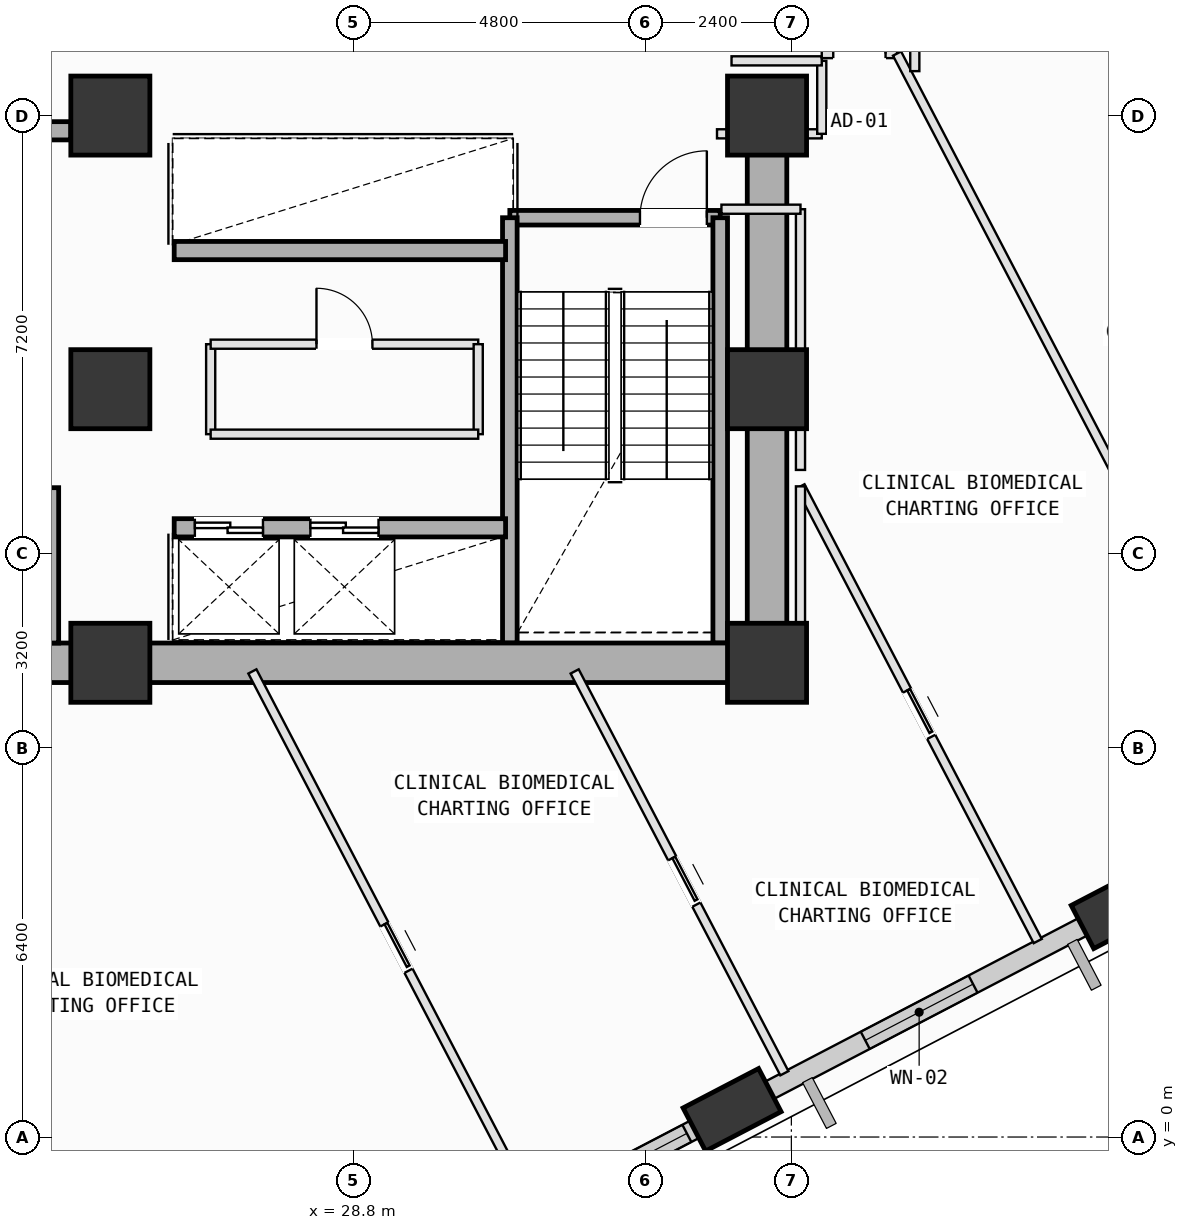
"""IFC4 building model, lengths in metres.
Left out: names, types, materials, properties, quantities, classifications, styles, units other than length and angle.
Written with IfcOpenShell. Run it as: python <this file> out.ifc"""

import sys

from ifc_helpers import new_model, si_unit, direction, frame, frame_2d, origin, origin_2d, place, context, subcontext, project, spatial, rectangle, extrude, element, fill, save


model = new_model("IFC4")
c1 = context("Model", 3, precision=1e-05, world=origin(), true_north=direction((0.0, 1.0)))
c2 = subcontext(c1, "Body", "Model", "MODEL_VIEW")
j1 = project(units=[si_unit("LENGTHUNIT", "METRE"), si_unit("PLANEANGLEUNIT", "RADIAN")], contexts=[c1])
p1 = place(None, origin())
s1 = spatial("IfcSite", under=j1, at=p1, CompositionType="ELEMENT")
p2 = place(p1, origin())
s2 = spatial("IfcBuilding", under=s1, at=p2, CompositionType="ELEMENT")
p3 = place(p2, frame((0.0, 0.0, 140.4)))
s3 = spatial("IfcBuildingStorey", under=s2, at=p3, CompositionType="ELEMENT", Elevation=140.4)
for number, where, z_axis, x_axis in (
    (1, (24.8, 7.8, 0.0), (0.0, 0.0, 1.0), (1.0, 0.0, 0.0)),
    (2, (24.8, 12.3, 0.0), (0.0, 0.0, 1.0), (1.0, 0.0, 0.0)),
    (3, (24.8, 16.8, 0.0), (0.0, 0.0, 1.0), (1.0, 0.0, 0.0)),
    (4, (35.6, 7.8, 0.0), (0.0, 0.0, 1.0), (1.0, 0.0, 0.0)),
    (5, (35.6, 12.3, 0.0), (0.0, 0.0, 1.0), (1.0, 0.0, 0.0)),
    (6, (35.6, 16.8, 0.0), (0.0, 0.0, 1.0), (1.0, 0.0, 0.0)),
):
    element("IfcColumn", number, at=place(p3, frame(where, z_axis=z_axis, x_axis=x_axis)), inside=s3, PredefinedType="COLUMN", context=c2, shape_type="SweptSolid", body=[
        extrude(rectangle(XDim=1.3, YDim=1.3, at=origin_2d()), origin(), (0.0, 0.0, 1.0), 4.0),
    ])
p4 = place(p3, frame((35.025, 0.448, 0.002), z_axis=(0.10037706971, 0.006741281946, 0.994926629955), x_axis=(-0.518552018438, 0.853779039419, 0.046531237063)))
e7 = element("IfcColumn", 7, at=p4, inside=s3, PredefinedType="COLUMN", context=c2, shape_type="SweptSolid", body=[
    extrude(rectangle(XDim=1.4, YDim=0.8, at=origin_2d()), origin(), (0.0, 0.0, 1.0), 3.948),
])
p5 = place(p3, frame((41.409, 3.778, 0.002), z_axis=(0.086534580575, 0.032944951033, 0.995703970348), x_axis=(-0.745854703715, 0.664730498128, 0.042826694996)))
e8 = element("IfcColumn", 8, at=p5, inside=s3, PredefinedType="COLUMN", context=c2, shape_type="SweptSolid", body=[
    extrude(rectangle(XDim=1.4, YDim=0.8, at=origin_2d()), origin(), (0.0, 0.0, 1.0), 3.95),
])
p6 = place(p3, frame((34.755, 0.307, 0.0), z_axis=(0.0, 0.0, 1.0), x_axis=(-0.886619757444, -0.462499087253, 0.0)))
e9 = element("IfcWall", 9, at=p6, inside=s3, PredefinedType="SOLIDWALL", context=c2, shape_type="SweptSolid", body=[
    extrude(rectangle(XDim=6.234, YDim=0.32, at=frame_2d((3.117, 0.0))), origin(), (0.0, 0.0, 1.0), 3.085),
])
p7 = place(p6, frame((0.534, 0.0, 0.75)))
e10 = element("IfcOpeningElement", 10, at=p7, cuts=e9, PredefinedType="OPENING", context=c2, shape_type="SweptSolid", body=[
    extrude(rectangle(XDim=1.6, YDim=1.95, at=frame_2d((0.8, 0.975))), frame((0.0, 0.17, 0.0), z_axis=(0.0, -1.0, 0.0), x_axis=(1.0, 0.0, 0.0)), (0.0, 0.0, 1.0), 0.34),
])
p8 = place(p3, frame((41.133, 3.634, 0.0), z_axis=(0.0, 0.0, 1.0), x_axis=(-0.886602358558, -0.462532439726, 0.0)))
e11 = element("IfcWall", 11, at=p8, inside=s3, PredefinedType="SOLIDWALL", context=c2, shape_type="SweptSolid", body=[
    extrude(rectangle(XDim=6.214, YDim=0.32, at=frame_2d((3.107, 0.0))), origin(), (0.0, 0.0, 1.0), 3.085),
])
p9 = place(p8, frame((2.419, 0.0, 0.75)))
e12 = element("IfcOpeningElement", 12, at=p9, cuts=e11, PredefinedType="OPENING", context=c2, shape_type="SweptSolid", body=[
    extrude(rectangle(XDim=2.0, YDim=1.95, at=frame_2d((1.0, 0.975))), frame((0.0, 0.17, 0.0), z_axis=(0.0, -1.0, 0.0), x_axis=(1.0, 0.0, 0.0)), (0.0, 0.0, 1.0), 0.34),
])
p10 = place(p3, frame((31.37, 15.12, 0.0), z_axis=(0.0, 0.0, 1.0), x_axis=(1.0, 0.0, 0.0)))
e13 = element("IfcWall", 13, at=p10, inside=s3, PredefinedType="SOLIDWALL", context=c2, shape_type="SweptSolid", body=[
    extrude(rectangle(XDim=3.46, YDim=0.24, at=frame_2d((1.73, 0.0))), origin(), (0.0, 0.0, 1.0), 3.7),
])
p11 = place(p10, frame((2.14, 0.0, 0.0)))
e14 = element("IfcOpeningElement", 14, at=p11, cuts=e13, PredefinedType="OPENING", context=c2, shape_type="SweptSolid", body=[
    extrude(rectangle(XDim=1.1, YDim=2.15, at=frame_2d((0.55, 1.075))), frame((0.0, 0.13, 0.0), z_axis=(0.0, -1.0, 0.0), x_axis=(1.0, 0.0, 0.0)), (0.0, 0.0, 1.0), 0.26),
])
for number, where, z_axis, x_axis in (
    (15, (34.83, 15.12, 0.0), (0.0, 0.0, 1.0), (0.0, -1.0, 0.0)),
    (16, (31.37, 8.125, 0.0), (0.0, 0.0, 1.0), (0.0, 1.0, 0.0)),
):
    element("IfcWall", number, at=place(p3, frame(where, z_axis=z_axis, x_axis=x_axis)), inside=s3, PredefinedType="SOLIDWALL", context=c2, shape_type="SweptSolid", body=[
        extrude(rectangle(XDim=6.995, YDim=0.24, at=frame_2d((3.498, 0.0))), origin(), (0.0, 0.0, 1.0), 3.7),
    ])
for number, where, z_axis, x_axis in (
    (17, (14.0, 7.8, 0.0), (0.0, 0.0, 1.0), (1.0, 0.0, 0.0)),
    (18, (24.8, 7.8, 0.0), (0.0, 0.0, 1.0), (1.0, 0.0, 0.0)),
):
    element("IfcWall", number, at=place(p3, frame(where, z_axis=z_axis, x_axis=x_axis)), inside=s3, PredefinedType="SHEAR", context=c2, shape_type="SweptSolid", body=[
        extrude(rectangle(XDim=10.8, YDim=0.65, at=frame_2d((5.4, 0.0))), origin(), (0.0, 0.0, 1.0), 3.7),
    ])
p12 = place(p3, frame((35.6, 7.8, 0.0), z_axis=(0.0, 0.0, 1.0), x_axis=(0.0, 1.0, 0.0)))
e19 = element("IfcWall", 19, at=p12, inside=s3, PredefinedType="SHEAR", context=c2, shape_type="SweptSolid", body=[
    extrude(rectangle(XDim=9.0, YDim=0.65, at=frame_2d((4.5, 0.0))), origin(), (0.0, 0.0, 1.0), 3.7),
])
p13 = place(p3, frame((19.85, 16.55, 0.0), z_axis=(0.0, 0.0, 1.0), x_axis=(1.0, 0.0, 0.0)))
e20 = element("IfcWall", 20, at=p13, inside=s3, PredefinedType="SOLIDWALL", context=c2, shape_type="SweptSolid", body=[
    extrude(rectangle(XDim=4.3, YDim=0.3, at=frame_2d((2.15, 0.0))), origin(), (0.0, 0.0, 1.0), 3.7),
])
p14 = place(p13, frame((0.475, 0.0, 0.0)))
e21 = element("IfcOpeningElement", 21, at=p14, cuts=e20, PredefinedType="OPENING", context=c2, shape_type="SweptSolid", body=[
    extrude(rectangle(XDim=1.25, YDim=2.18, at=frame_2d((0.625, 1.09))), frame((0.0, 0.16, 0.0), z_axis=(0.0, -1.0, 0.0), x_axis=(1.0, 0.0, 0.0)), (0.0, 0.0, 1.0), 0.32),
])
p15 = place(p13, frame((2.49, 0.0, 0.0)))
e22 = element("IfcOpeningElement", 22, at=p15, cuts=e20, PredefinedType="OPENING", context=c2, shape_type="SweptSolid", body=[
    extrude(rectangle(XDim=1.02, YDim=2.12, at=frame_2d((0.51, 1.06))), frame((0.0, 0.16, 0.0), z_axis=(0.0, -1.0, 0.0), x_axis=(1.0, 0.0, 0.0)), (0.0, 0.0, 1.0), 0.32),
])
p16 = place(p3, frame((23.8, 8.125, 0.0), z_axis=(0.0, 0.0, 1.0), x_axis=(0.0, 1.0, 0.0)))
e23 = element("IfcWall", 23, at=p16, inside=s3, PredefinedType="SOLIDWALL", context=c2, shape_type="SweptSolid", body=[
    extrude(rectangle(XDim=2.555, YDim=0.3, at=frame_2d((1.277, 0.0))), origin(), (0.0, 0.0, 1.0), 3.7),
])
p17 = place(p3, frame((25.85, 10.02, 0.0), z_axis=(0.0, 0.0, 1.0), x_axis=(1.0, 0.0, 0.0)))
e24 = element("IfcWall", 24, at=p17, inside=s3, PredefinedType="SOLIDWALL", context=c2, shape_type="SweptSolid", body=[
    extrude(rectangle(XDim=5.45, YDim=0.3, at=frame_2d((2.725, 0.0))), origin(), (0.0, 0.0, 1.0), 3.7),
])
p18 = place(p17, frame((0.34, 0.0, 0.0)))
e25 = element("IfcOpeningElement", 25, at=p18, cuts=e24, PredefinedType="OPENING", context=c2, shape_type="SweptSolid", body=[
    extrude(rectangle(XDim=1.12, YDim=2.15, at=frame_2d((0.56, 1.075))), frame((0.0, 0.16, 0.0), z_axis=(0.0, -1.0, 0.0), x_axis=(1.0, 0.0, 0.0)), (0.0, 0.0, 1.0), 0.32),
])
p19 = place(p17, frame((2.24, 0.0, 0.0)))
e26 = element("IfcOpeningElement", 26, at=p19, cuts=e24, PredefinedType="OPENING", context=c2, shape_type="SweptSolid", body=[
    extrude(rectangle(XDim=1.12, YDim=2.15, at=frame_2d((0.56, 1.075))), frame((0.0, 0.16, 0.0), z_axis=(0.0, -1.0, 0.0), x_axis=(1.0, 0.0, 0.0)), (0.0, 0.0, 1.0), 0.32),
])
p20 = place(p3, frame((25.85, 14.58, 0.0), z_axis=(0.0, 0.0, 1.0), x_axis=(1.0, 0.0, 0.0)))
e27 = element("IfcWall", 27, at=p20, inside=s3, PredefinedType="SOLIDWALL", context=c2, shape_type="SweptSolid", body=[
    extrude(rectangle(XDim=5.45, YDim=0.3, at=frame_2d((2.725, 0.0))), origin(), (0.0, 0.0, 1.0), 3.7),
])
p21 = place(p3, frame((26.45, 11.56, 0.0), z_axis=(0.0, 0.0, 1.0), x_axis=(0.0, 1.0, 0.0)))
e28 = element("IfcWall", 28, at=p21, inside=s3, PredefinedType="PARTITIONING", context=c2, shape_type="SweptSolid", body=[
    extrude(rectangle(XDim=1.48, YDim=0.15, at=frame_2d((0.74, 0.0))), origin(), (0.0, 0.0, 1.0), 3.7),
])
p22 = place(p3, frame((26.45, 13.04, 0.0), z_axis=(0.0, 0.0, 1.0), x_axis=(1.0, 0.0, 0.0)))
e29 = element("IfcWall", 29, at=p22, inside=s3, PredefinedType="PARTITIONING", context=c2, shape_type="SweptSolid", body=[
    extrude(rectangle(XDim=4.4, YDim=0.15, at=frame_2d((2.2, 0.0))), origin(), (0.0, 0.0, 1.0), 3.7),
])
p23 = place(p22, frame((1.74, 0.0, 0.0)))
e30 = element("IfcOpeningElement", 30, at=p23, cuts=e29, PredefinedType="OPENING", context=c2, shape_type="SweptSolid", body=[
    extrude(rectangle(XDim=0.92, YDim=2.1, at=frame_2d((0.46, 1.05))), frame((0.0, 0.085, 0.0), z_axis=(0.0, -1.0, 0.0), x_axis=(1.0, 0.0, 0.0)), (0.0, 0.0, 1.0), 0.17),
])
p24 = place(p3, frame((30.85, 13.04, 0.0), z_axis=(0.0, 0.0, 1.0), x_axis=(0.0, -1.0, 0.0)))
e31 = element("IfcWall", 31, at=p24, inside=s3, PredefinedType="PARTITIONING", context=c2, shape_type="SweptSolid", body=[
    extrude(rectangle(XDim=1.48, YDim=0.15, at=frame_2d((0.74, 0.0))), origin(), (0.0, 0.0, 1.0), 3.7),
])
p25 = place(p3, frame((30.85, 11.56, 0.0), z_axis=(0.0, 0.0, 1.0), x_axis=(-1.0, 0.0, 0.0)))
e32 = element("IfcWall", 32, at=p25, inside=s3, PredefinedType="PARTITIONING", context=c2, shape_type="SweptSolid", body=[
    extrude(rectangle(XDim=4.4, YDim=0.15, at=frame_2d((2.2, 0.0))), origin(), (0.0, 0.0, 1.0), 3.7),
])
p26 = place(p3, frame((27.136, 7.658, 0.0), z_axis=(0.0, 0.0, 1.0), x_axis=(0.462417770768, -0.886662170884, 0.0)))
e33 = element("IfcWall", 33, at=p26, inside=s3, PredefinedType="PARTITIONING", context=c2, shape_type="SweptSolid", body=[
    extrude(rectangle(XDim=9.907, YDim=0.15, at=frame_2d((4.953, 0.0))), origin(), (0.0, 0.0, 1.0), 3.7),
])
p27 = place(p26, frame((4.693, 0.0, 0.0)))
e34 = element("IfcOpeningElement", 34, at=p27, cuts=e33, PredefinedType="OPENING", context=c2, shape_type="SweptSolid", body=[
    extrude(rectangle(XDim=0.86, YDim=2.06, at=frame_2d((0.43, 1.03))), frame((0.0, 0.085, 0.0), z_axis=(0.0, -1.0, 0.0), x_axis=(1.0, 0.0, 0.0)), (0.0, 0.0, 1.0), 0.17),
])
p28 = place(p3, frame((35.73, 0.556, 0.0), z_axis=(0.0, 0.0, 1.0), x_axis=(-0.886562611736, -0.462608620188, 0.0)))
e35 = element("IfcWall", 35, at=p28, inside=s3, PredefinedType="PARTITIONING", context=c2, shape_type="SweptSolid", body=[
    extrude(rectangle(XDim=0.979, YDim=0.15, at=frame_2d((0.49, 0.0))), origin(), (0.0, 0.0, 1.0), 3.085),
])
p29 = place(p3, frame((32.436, 7.658, 0.0), z_axis=(0.0, 0.0, 1.0), x_axis=(0.462656662388, -0.886537541646, 0.0)))
e36 = element("IfcWall", 36, at=p29, inside=s3, PredefinedType="PARTITIONING", context=c2, shape_type="SweptSolid", body=[
    extrude(rectangle(XDim=7.455, YDim=0.15, at=frame_2d((3.728, 0.0))), origin(), (0.0, 0.0, 1.0), 3.7),
])
p30 = place(p29, frame((3.467, 0.0, 0.0)))
e37 = element("IfcOpeningElement", 37, at=p30, cuts=e36, PredefinedType="OPENING", context=c2, shape_type="SweptSolid", body=[
    extrude(rectangle(XDim=0.86, YDim=2.06, at=frame_2d((0.43, 1.03))), frame((0.0, 0.085, 0.0), z_axis=(0.0, -1.0, 0.0), x_axis=(1.0, 0.0, 0.0)), (0.0, 0.0, 1.0), 0.17),
])
p31 = place(p3, frame((36.15, 10.702, 0.0), z_axis=(0.0, 0.0, 1.0), x_axis=(0.462566995769, -0.886584330126, 0.0)))
e38 = element("IfcWall", 38, at=p31, inside=s3, PredefinedType="PARTITIONING", context=c2, shape_type="SweptSolid", body=[
    extrude(rectangle(XDim=8.436, YDim=0.15, at=frame_2d((4.218, 0.0))), origin(), (0.0, 0.0, 1.0), 3.7),
])
p32 = place(p31, frame((3.788, 0.0, 0.0)))
e39 = element("IfcOpeningElement", 39, at=p32, cuts=e38, PredefinedType="OPENING", context=c2, shape_type="SweptSolid", body=[
    extrude(rectangle(XDim=0.86, YDim=2.06, at=frame_2d((0.43, 1.03))), frame((0.0, 0.085, 0.0), z_axis=(0.0, -1.0, 0.0), x_axis=(1.0, 0.0, 0.0)), (0.0, 0.0, 1.0), 0.17),
])
p33 = place(p3, frame((35.6, 7.5, 0.0), z_axis=(0.0, 0.0, 1.0), x_axis=(1.0, 0.0, 0.0)))
e40 = element("IfcWall", 40, at=p33, inside=s3, PredefinedType="PARTITIONING", context=c2, shape_type="SweptSolid", body=[
    extrude(rectangle(XDim=0.55, YDim=0.15, at=frame_2d((0.275, 0.0))), origin(), (0.0, 0.0, 1.0), 2.885),
])
p34 = place(p3, frame((36.15, 7.5, 0.0), z_axis=(0.0, 0.0, 1.0), x_axis=(0.0, 1.0, 0.0)))
e41 = element("IfcWall", 41, at=p34, inside=s3, PredefinedType="PARTITIONING", context=c2, shape_type="SweptSolid", body=[
    extrude(rectangle(XDim=3.202, YDim=0.15, at=frame_2d((1.601, 0.0))), origin(), (0.0, 0.0, 1.0), 3.7),
])
p35 = place(p3, frame((34.777, 16.5, 0.0), z_axis=(0.0, 0.0, 1.0), x_axis=(1.0, 0.0, 0.0)))
e42 = element("IfcWall", 42, at=p35, inside=s3, PredefinedType="PARTITIONING", context=c2, shape_type="SweptSolid", body=[
    extrude(rectangle(XDim=1.723, YDim=0.15, at=frame_2d((0.861, 0.0))), origin(), (0.0, 0.0, 1.0), 2.885),
])
p36 = place(p3, frame((36.5, 16.5, 0.0), z_axis=(0.0, 0.0, 1.0), x_axis=(0.0, 1.0, 0.0)))
e43 = element("IfcWall", 43, at=p36, inside=s3, PredefinedType="PARTITIONING", context=c2, shape_type="SweptSolid", body=[
    extrude(rectangle(XDim=1.2, YDim=0.15, at=frame_2d((0.6, 0.0))), origin(), (0.0, 0.0, 1.0), 3.7),
])
p37 = place(p3, frame((36.5, 17.7, 0.0), z_axis=(0.0, 0.0, 1.0), x_axis=(-1.0, 0.0, 0.0)))
e44 = element("IfcWall", 44, at=p37, inside=s3, PredefinedType="PARTITIONING", context=c2, shape_type="SweptSolid", body=[
    extrude(rectangle(XDim=1.484, YDim=0.15, at=frame_2d((0.742, 0.0))), origin(), (0.0, 0.0, 1.0), 3.7),
])
p38 = place(p3, frame((36.5, 17.82, 0.0), z_axis=(0.0, 0.0, 1.0), x_axis=(1.0, 0.0, 0.0)))
e45 = element("IfcWall", 45, at=p38, inside=s3, PredefinedType="PARTITIONING", context=c2, shape_type="SweptSolid", body=[
    extrude(rectangle(XDim=1.238, YDim=0.15, at=frame_2d((0.619, 0.0))), origin(), (0.0, 0.0, 1.0), 2.885),
])
p39 = place(p38, frame((0.189, 0.0, 0.0)))
e46 = element("IfcOpeningElement", 46, at=p39, cuts=e45, PredefinedType="OPENING", context=c2, shape_type="SweptSolid", body=[
    extrude(rectangle(XDim=0.86, YDim=2.06, at=frame_2d((0.43, 1.03))), frame((0.0, 0.085, 0.0), z_axis=(0.0, -1.0, 0.0), x_axis=(1.0, 0.0, 0.0)), (0.0, 0.0, 1.0), 0.17),
])
p40 = place(p3, frame((37.738, 17.82, 0.0), z_axis=(0.0, 0.0, 1.0), x_axis=(0.462500508859, -0.886619015872, 0.0)))
e47 = element("IfcWall", 47, at=p40, inside=s3, PredefinedType="PARTITIONING", context=c2, shape_type="SweptSolid", body=[
    extrude(rectangle(XDim=14.013, YDim=0.15, at=frame_2d((7.006, 0.0))), origin(), (0.0, 0.0, 1.0), 3.7),
])
p41 = place(p3, frame((42.118, 3.889, 0.0), z_axis=(0.0, 0.0, 1.0), x_axis=(-0.886409168766, -0.462902565911, 0.0)))
e48 = element("IfcWall", 48, at=p41, inside=s3, PredefinedType="PARTITIONING", context=c2, shape_type="SweptSolid", body=[
    extrude(rectangle(XDim=0.991, YDim=0.15, at=frame_2d((0.496, 0.0))), origin(), (0.0, 0.0, 1.0), 3.085),
])
p42 = place(p3, frame((36.15, 10.972, 0.0), z_axis=(0.0, 0.0, 1.0), x_axis=(0.0, 1.0, 0.0)))
e49 = element("IfcWall", 49, at=p42, inside=s3, PredefinedType="PARTITIONING", context=c2, shape_type="SweptSolid", body=[
    extrude(rectangle(XDim=4.288, YDim=0.15, at=frame_2d((2.144, 0.0))), origin(), (0.0, 0.0, 1.0), 3.7),
])
p43 = place(p3, frame((36.15, 15.26, 0.0), z_axis=(0.0, 0.0, 1.0), x_axis=(-1.0, 0.0, 0.0)))
e50 = element("IfcWall", 50, at=p43, inside=s3, PredefinedType="PARTITIONING", context=c2, shape_type="SweptSolid", body=[
    extrude(rectangle(XDim=1.3, YDim=0.15, at=frame_2d((0.65, 0.0))), origin(), (0.0, 0.0, 1.0), 3.7),
])
p44 = place(p3, frame((38.03, 17.531, 0.0), z_axis=(0.0, 0.0, 1.0), x_axis=(0.0, 1.0, 0.0)))
e51 = element("IfcWall", 51, at=p44, inside=s3, PredefinedType="PARTITIONING", context=c2, shape_type="SweptSolid", body=[
    extrude(rectangle(XDim=1.741, YDim=0.15, at=frame_2d((0.871, 0.0))), origin(), (0.0, 0.0, 1.0), 3.7),
])
p45 = place(p7, origin())
e52 = element("IfcWindow", 52, at=p45, inside=s3, PartitioningType="SINGLE_PANEL", PredefinedType="WINDOW", context=c2, shape_type="SweptSolid", body=[
    extrude(rectangle(XDim=1.6, YDim=1.95, at=frame_2d((0.8, 0.975))), frame((0.0, 0.03, 0.0), z_axis=(0.0, -1.0, 0.0), x_axis=(1.0, 0.0, 0.0)), (0.0, 0.0, 1.0), 0.06),
])
fill(e10, e52)
p46 = place(p9, origin())
e53 = element("IfcWindow", 53, at=p46, inside=s3, PartitioningType="SINGLE_PANEL", PredefinedType="WINDOW", context=c2, shape_type="SweptSolid", body=[
    extrude(rectangle(XDim=2.0, YDim=1.95, at=frame_2d((1.0, 0.975))), frame((0.0, 0.03, 0.0), z_axis=(0.0, -1.0, 0.0), x_axis=(1.0, 0.0, 0.0)), (0.0, 0.0, 1.0), 0.06),
])
fill(e12, e53)
p47 = place(p11, origin())
e54 = element("IfcDoor", 54, at=p47, inside=s3, OperationType="SINGLE_SWING_RIGHT", PredefinedType="DOOR", context=c2, shape_type="SweptSolid", body=[
    extrude(rectangle(XDim=1.1, YDim=2.15, at=frame_2d((0.55, 1.075))), frame((0.0, 0.025, 0.0), z_axis=(0.0, -1.0, 0.0), x_axis=(1.0, 0.0, 0.0)), (0.0, 0.0, 1.0), 0.05),
])
fill(e14, e54)
p48 = place(p18, origin())
e55 = element("IfcDoor", 55, at=p48, inside=s3, OperationType="DOUBLE_DOOR_SLIDING", PredefinedType="DOOR", context=c2, shape_type="SweptSolid", body=[
    extrude(rectangle(XDim=1.12, YDim=2.15, at=frame_2d((0.56, 1.075))), frame((0.0, 0.025, 0.0), z_axis=(0.0, -1.0, 0.0), x_axis=(1.0, 0.0, 0.0)), (0.0, 0.0, 1.0), 0.05),
])
fill(e25, e55)
p49 = place(p19, origin())
e56 = element("IfcDoor", 56, at=p49, inside=s3, OperationType="DOUBLE_DOOR_SLIDING", PredefinedType="DOOR", context=c2, shape_type="SweptSolid", body=[
    extrude(rectangle(XDim=1.12, YDim=2.15, at=frame_2d((0.56, 1.075))), frame((0.0, 0.025, 0.0), z_axis=(0.0, -1.0, 0.0), x_axis=(1.0, 0.0, 0.0)), (0.0, 0.0, 1.0), 0.05),
])
fill(e26, e56)
p50 = place(p23, origin())
e57 = element("IfcDoor", 57, at=p50, inside=s3, OperationType="SINGLE_SWING_LEFT", PredefinedType="DOOR", context=c2, shape_type="SweptSolid", body=[
    extrude(rectangle(XDim=0.92, YDim=2.1, at=frame_2d((0.46, 1.05))), frame((0.0, 0.025, 0.0), z_axis=(0.0, -1.0, 0.0), x_axis=(1.0, 0.0, 0.0)), (0.0, 0.0, 1.0), 0.05),
])
fill(e30, e57)
p51 = place(p39, origin())
e58 = element("IfcDoor", 58, at=p51, inside=s3, OperationType="SINGLE_SWING_RIGHT", PredefinedType="DOOR", context=c2, shape_type="SweptSolid", body=[
    extrude(rectangle(XDim=0.86, YDim=2.06, at=frame_2d((0.43, 1.03))), frame((0.0, 0.025, 0.0), z_axis=(0.0, -1.0, 0.0), x_axis=(1.0, 0.0, 0.0)), (0.0, 0.0, 1.0), 0.05),
])
fill(e46, e58)
p52 = place(p32, origin())
e59 = element("IfcDoor", 59, at=p52, inside=s3, OperationType="SLIDING_TO_LEFT", PredefinedType="DOOR", context=c2, shape_type="SweptSolid", body=[
    extrude(rectangle(XDim=0.86, YDim=2.06, at=frame_2d((0.43, 1.03))), frame((0.0, 0.025, 0.0), z_axis=(0.0, -1.0, 0.0), x_axis=(1.0, 0.0, 0.0)), (0.0, 0.0, 1.0), 0.05),
])
fill(e39, e59)
p53 = place(p30, origin())
e60 = element("IfcDoor", 60, at=p53, inside=s3, OperationType="SLIDING_TO_LEFT", PredefinedType="DOOR", context=c2, shape_type="SweptSolid", body=[
    extrude(rectangle(XDim=0.86, YDim=2.06, at=frame_2d((0.43, 1.03))), frame((0.0, 0.025, 0.0), z_axis=(0.0, -1.0, 0.0), x_axis=(1.0, 0.0, 0.0)), (0.0, 0.0, 1.0), 0.05),
])
fill(e37, e60)
p54 = place(p27, origin())
e61 = element("IfcDoor", 61, at=p54, inside=s3, OperationType="SLIDING_TO_LEFT", PredefinedType="DOOR", context=c2, shape_type="SweptSolid", body=[
    extrude(rectangle(XDim=0.86, YDim=2.06, at=frame_2d((0.43, 1.03))), frame((0.0, 0.025, 0.0), z_axis=(0.0, -1.0, 0.0), x_axis=(1.0, 0.0, 0.0)), (0.0, 0.0, 1.0), 0.05),
])
fill(e34, e61)
save(model, sys.argv[1])
